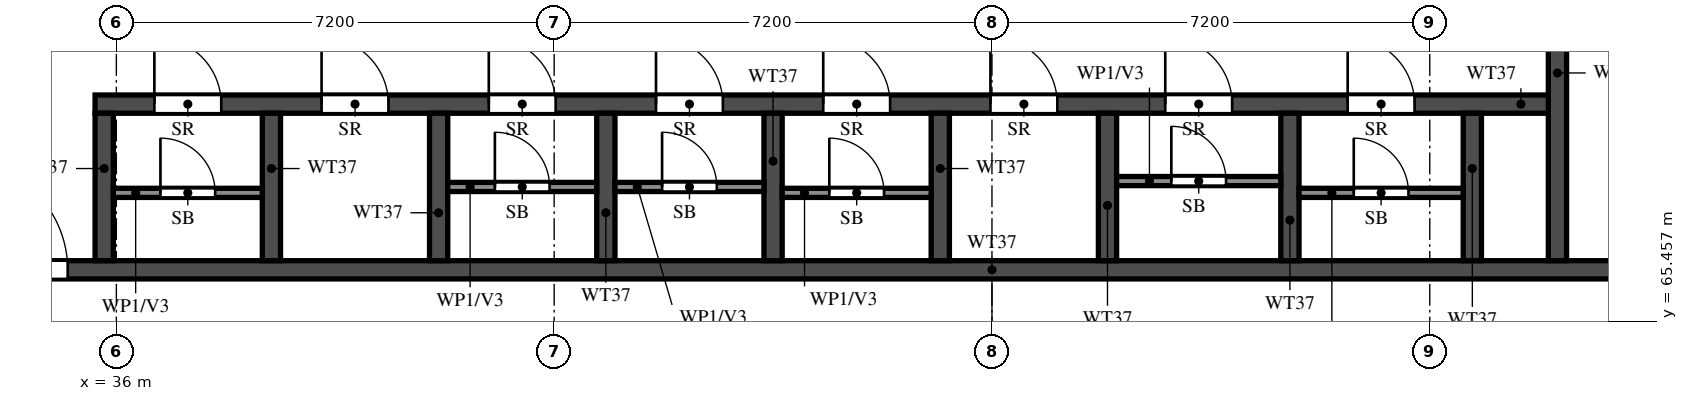
"""IFC4 building model, lengths in metres.
Left out: names, types, materials, properties, quantities, classifications, styles, units other than length and angle.
Written with IfcOpenShell. Run it as: python <this file> out.ifc"""

import sys

from ifc_helpers import new_model, si_unit, direction, frame, frame_2d, origin, place, context, subcontext, project, spatial, rectangle, extrude, element, fill, save


model = new_model("IFC4")
c1 = context("Model", 3, precision=1e-05, world=origin(), true_north=direction((0.0, 1.0)))
c2 = subcontext(c1, "Body", "Model", "MODEL_VIEW")
j1 = project(units=[si_unit("LENGTHUNIT", "METRE"), si_unit("PLANEANGLEUNIT", "RADIAN")], contexts=[c1])
p1 = place(None, origin())
s1 = spatial("IfcSite", under=j1, at=p1, CompositionType="ELEMENT")
p2 = place(p1, origin())
s2 = spatial("IfcBuilding", under=s1, at=p2, CompositionType="ELEMENT")
p3 = place(p2, frame((0.0, 0.0, 229.0)))
s3 = spatial("IfcBuildingStorey", under=s2, at=p3, CompositionType="ELEMENT", Elevation=229.0)
p4 = place(p3, frame((29.2, 66.3, 0.0), z_axis=(0.0, 0.0, 1.0), x_axis=(1.0, 0.0, 0.0)))
e1 = element("IfcWall", 1, at=p4, inside=s3, PredefinedType="SHEAR", context=c2, shape_type="SweptSolid", body=[
    extrude(rectangle(XDim=42.4, YDim=0.3, at=frame_2d((21.2, 0.0))), origin(), (0.0, 0.0, 1.0), 3.22),
])
p5 = place(p4, frame((1.425, 0.0, 0.0)))
e2 = element("IfcOpeningElement", 2, at=p5, cuts=e1, PredefinedType="OPENING", context=c2, shape_type="SweptSolid", body=[
    extrude(rectangle(XDim=1.1, YDim=2.1, at=frame_2d((0.55, 1.05))), frame((0.0, 0.16, 0.0), z_axis=(0.0, -1.0, 0.0), x_axis=(1.0, 0.0, 0.0)), (0.0, 0.0, 1.0), 0.32),
])
p6 = place(p4, frame((4.2, 0.0, 0.0)))
e3 = element("IfcOpeningElement", 3, at=p6, cuts=e1, PredefinedType="OPENING", context=c2, shape_type="SweptSolid", body=[
    extrude(rectangle(XDim=1.8, YDim=2.1, at=frame_2d((0.9, 1.05))), frame((0.0, 0.16, 0.0), z_axis=(0.0, -1.0, 0.0), x_axis=(1.0, 0.0, 0.0)), (0.0, 0.0, 1.0), 0.32),
])
p7 = place(p3, frame((35.65, 69.025, 0.0), z_axis=(0.0, 0.0, 1.0), x_axis=(1.0, 0.0, 0.0)))
e4 = element("IfcWall", 4, at=p7, inside=s3, PredefinedType="SHEAR", context=c2, shape_type="SweptSolid", body=[
    extrude(rectangle(XDim=24.05, YDim=0.3, at=frame_2d((12.025, 0.0))), origin(), (0.0, 0.0, 1.0), 3.22),
])
p8 = place(p7, frame((0.975, 0.0, 0.0)))
e5 = element("IfcOpeningElement", 5, at=p8, cuts=e4, PredefinedType="OPENING", context=c2, shape_type="SweptSolid", body=[
    extrude(rectangle(XDim=1.1, YDim=2.1, at=frame_2d((0.55, 1.05))), frame((0.0, 0.16, 0.0), z_axis=(0.0, -1.0, 0.0), x_axis=(1.0, 0.0, 0.0)), (0.0, 0.0, 1.0), 0.32),
])
p9 = place(p7, frame((3.725, 0.0, 0.0)))
e6 = element("IfcOpeningElement", 6, at=p9, cuts=e4, PredefinedType="OPENING", context=c2, shape_type="SweptSolid", body=[
    extrude(rectangle(XDim=1.1, YDim=2.1, at=frame_2d((0.55, 1.05))), frame((0.0, 0.16, 0.0), z_axis=(0.0, -1.0, 0.0), x_axis=(1.0, 0.0, 0.0)), (0.0, 0.0, 1.0), 0.32),
])
p10 = place(p7, frame((6.475, 0.0, 0.0)))
e7 = element("IfcOpeningElement", 7, at=p10, cuts=e4, PredefinedType="OPENING", context=c2, shape_type="SweptSolid", body=[
    extrude(rectangle(XDim=1.1, YDim=2.1, at=frame_2d((0.55, 1.05))), frame((0.0, 0.16, 0.0), z_axis=(0.0, -1.0, 0.0), x_axis=(1.0, 0.0, 0.0)), (0.0, 0.0, 1.0), 0.32),
])
p11 = place(p7, frame((9.225, 0.0, 0.0)))
e8 = element("IfcOpeningElement", 8, at=p11, cuts=e4, PredefinedType="OPENING", context=c2, shape_type="SweptSolid", body=[
    extrude(rectangle(XDim=1.1, YDim=2.1, at=frame_2d((0.55, 1.05))), frame((0.0, 0.16, 0.0), z_axis=(0.0, -1.0, 0.0), x_axis=(1.0, 0.0, 0.0)), (0.0, 0.0, 1.0), 0.32),
])
p12 = place(p7, frame((11.975, 0.0, 0.0)))
e9 = element("IfcOpeningElement", 9, at=p12, cuts=e4, PredefinedType="OPENING", context=c2, shape_type="SweptSolid", body=[
    extrude(rectangle(XDim=1.1, YDim=2.1, at=frame_2d((0.55, 1.05))), frame((0.0, 0.16, 0.0), z_axis=(0.0, -1.0, 0.0), x_axis=(1.0, 0.0, 0.0)), (0.0, 0.0, 1.0), 0.32),
])
p13 = place(p7, frame((14.725, 0.0, 0.0)))
e10 = element("IfcOpeningElement", 10, at=p13, cuts=e4, PredefinedType="OPENING", context=c2, shape_type="SweptSolid", body=[
    extrude(rectangle(XDim=1.1, YDim=2.1, at=frame_2d((0.55, 1.05))), frame((0.0, 0.16, 0.0), z_axis=(0.0, -1.0, 0.0), x_axis=(1.0, 0.0, 0.0)), (0.0, 0.0, 1.0), 0.32),
])
p14 = place(p7, frame((17.6, 0.0, 0.0)))
e11 = element("IfcOpeningElement", 11, at=p14, cuts=e4, PredefinedType="OPENING", context=c2, shape_type="SweptSolid", body=[
    extrude(rectangle(XDim=1.1, YDim=2.1, at=frame_2d((0.55, 1.05))), frame((0.0, 0.16, 0.0), z_axis=(0.0, -1.0, 0.0), x_axis=(1.0, 0.0, 0.0)), (0.0, 0.0, 1.0), 0.32),
])
p15 = place(p7, frame((20.6, 0.0, 0.0)))
e12 = element("IfcOpeningElement", 12, at=p15, cuts=e4, PredefinedType="OPENING", context=c2, shape_type="SweptSolid", body=[
    extrude(rectangle(XDim=1.1, YDim=2.1, at=frame_2d((0.55, 1.05))), frame((0.0, 0.16, 0.0), z_axis=(0.0, -1.0, 0.0), x_axis=(1.0, 0.0, 0.0)), (0.0, 0.0, 1.0), 0.32),
])
p16 = place(p3, frame((59.7, 66.45, 0.0), z_axis=(0.0, 0.0, 1.0), x_axis=(0.0, 1.0, 0.0)))
e13 = element("IfcWall", 13, at=p16, inside=s3, PredefinedType="SHEAR", context=c2, shape_type="SweptSolid", body=[
    extrude(rectangle(XDim=6.175, YDim=0.3, at=frame_2d((3.087, 0.0))), origin(), (0.0, 0.0, 1.0), 3.22),
])
p17 = place(p16, frame((3.85, 0.0, 0.0)))
e14 = element("IfcOpeningElement", 14, at=p17, cuts=e13, PredefinedType="OPENING", context=c2, shape_type="SweptSolid", body=[
    extrude(rectangle(XDim=1.2, YDim=2.1, at=frame_2d((0.6, 1.05))), frame((0.0, 0.16, 0.0), z_axis=(0.0, -1.0, 0.0), x_axis=(1.0, 0.0, 0.0)), (0.0, 0.0, 1.0), 0.32),
])
for number, where, z_axis, x_axis in (
    (15, (35.8, 66.45, 0.0), (0.0, 0.0, 1.0), (0.0, 1.0, 0.0)),
    (16, (38.55, 66.45, 0.0), (0.0, 0.0, 1.0), (0.0, 1.0, 0.0)),
    (17, (41.3, 66.45, 0.0), (0.0, 0.0, 1.0), (0.0, 1.0, 0.0)),
    (18, (44.05, 66.45, 0.0), (0.0, 0.0, 1.0), (0.0, 1.0, 0.0)),
    (19, (46.8, 66.45, 0.0), (0.0, 0.0, 1.0), (0.0, 1.0, 0.0)),
    (20, (49.55, 66.45, 0.0), (0.0, 0.0, 1.0), (0.0, 1.0, 0.0)),
    (21, (52.3, 66.45, 0.0), (0.0, 0.0, 1.0), (0.0, 1.0, 0.0)),
    (22, (55.3, 66.45, 0.0), (0.0, 0.0, 1.0), (0.0, 1.0, 0.0)),
    (23, (58.3, 66.45, 0.0), (0.0, 0.0, 1.0), (0.0, 1.0, 0.0)),
):
    element("IfcWall", number, at=place(p3, frame(where, z_axis=z_axis, x_axis=x_axis)), inside=s3, PredefinedType="SHEAR", context=c2, shape_type="SweptSolid", body=[
        extrude(rectangle(XDim=2.425, YDim=0.3, at=frame_2d((1.212, 0.0))), origin(), (0.0, 0.0, 1.0), 3.22),
    ])
p18 = place(p3, frame((35.95, 67.565, 0.0), z_axis=(0.0, 0.0, 1.0), x_axis=(1.0, 0.0, 0.0)))
e24 = element("IfcWall", 24, at=p18, inside=s3, PredefinedType="PARTITIONING", context=c2, shape_type="SweptSolid", body=[
    extrude(rectangle(XDim=2.45, YDim=0.15, at=frame_2d((1.225, 0.0))), origin(), (0.0, 0.0, 1.0), 3.22),
])
p19 = place(p18, frame((0.775, 0.0, 0.0)))
e25 = element("IfcOpeningElement", 25, at=p19, cuts=e24, PredefinedType="OPENING", context=c2, shape_type="SweptSolid", body=[
    extrude(rectangle(XDim=0.9, YDim=2.1, at=frame_2d((0.45, 1.05))), frame((0.0, 0.085, 0.0), z_axis=(0.0, -1.0, 0.0), x_axis=(1.0, 0.0, 0.0)), (0.0, 0.0, 1.0), 0.17),
])
p20 = place(p3, frame((41.45, 67.663, 0.0), z_axis=(0.0, 0.0, 1.0), x_axis=(1.0, 0.0, 0.0)))
e26 = element("IfcWall", 26, at=p20, inside=s3, PredefinedType="PARTITIONING", context=c2, shape_type="SweptSolid", body=[
    extrude(rectangle(XDim=2.45, YDim=0.15, at=frame_2d((1.225, 0.0))), origin(), (0.0, 0.0, 1.0), 3.22),
])
p21 = place(p20, frame((0.775, 0.0, 0.0)))
e27 = element("IfcOpeningElement", 27, at=p21, cuts=e26, PredefinedType="OPENING", context=c2, shape_type="SweptSolid", body=[
    extrude(rectangle(XDim=0.9, YDim=2.1, at=frame_2d((0.45, 1.05))), frame((0.0, 0.085, 0.0), z_axis=(0.0, -1.0, 0.0), x_axis=(1.0, 0.0, 0.0)), (0.0, 0.0, 1.0), 0.17),
])
p22 = place(p3, frame((44.2, 67.663, 0.0), z_axis=(0.0, 0.0, 1.0), x_axis=(1.0, 0.0, 0.0)))
e28 = element("IfcWall", 28, at=p22, inside=s3, PredefinedType="PARTITIONING", context=c2, shape_type="SweptSolid", body=[
    extrude(rectangle(XDim=2.45, YDim=0.15, at=frame_2d((1.225, 0.0))), origin(), (0.0, 0.0, 1.0), 3.22),
])
p23 = place(p22, frame((0.775, 0.0, 0.0)))
e29 = element("IfcOpeningElement", 29, at=p23, cuts=e28, PredefinedType="OPENING", context=c2, shape_type="SweptSolid", body=[
    extrude(rectangle(XDim=0.9, YDim=2.1, at=frame_2d((0.45, 1.05))), frame((0.0, 0.085, 0.0), z_axis=(0.0, -1.0, 0.0), x_axis=(1.0, 0.0, 0.0)), (0.0, 0.0, 1.0), 0.17),
])
p24 = place(p3, frame((46.95, 67.565, 0.0), z_axis=(0.0, 0.0, 1.0), x_axis=(1.0, 0.0, 0.0)))
e30 = element("IfcWall", 30, at=p24, inside=s3, PredefinedType="PARTITIONING", context=c2, shape_type="SweptSolid", body=[
    extrude(rectangle(XDim=2.45, YDim=0.15, at=frame_2d((1.225, 0.0))), origin(), (0.0, 0.0, 1.0), 3.22),
])
p25 = place(p24, frame((0.775, 0.0, 0.0)))
e31 = element("IfcOpeningElement", 31, at=p25, cuts=e30, PredefinedType="OPENING", context=c2, shape_type="SweptSolid", body=[
    extrude(rectangle(XDim=0.9, YDim=2.1, at=frame_2d((0.45, 1.05))), frame((0.0, 0.085, 0.0), z_axis=(0.0, -1.0, 0.0), x_axis=(1.0, 0.0, 0.0)), (0.0, 0.0, 1.0), 0.17),
])
p26 = place(p3, frame((52.45, 67.76, 0.0), z_axis=(0.0, 0.0, 1.0), x_axis=(1.0, 0.0, 0.0)))
e32 = element("IfcWall", 32, at=p26, inside=s3, PredefinedType="PARTITIONING", context=c2, shape_type="SweptSolid", body=[
    extrude(rectangle(XDim=2.7, YDim=0.15, at=frame_2d((1.35, 0.0))), origin(), (0.0, 0.0, 1.0), 3.22),
])
p27 = place(p26, frame((0.9, 0.0, 0.0)))
e33 = element("IfcOpeningElement", 33, at=p27, cuts=e32, PredefinedType="OPENING", context=c2, shape_type="SweptSolid", body=[
    extrude(rectangle(XDim=0.9, YDim=2.1, at=frame_2d((0.45, 1.05))), frame((0.0, 0.085, 0.0), z_axis=(0.0, -1.0, 0.0), x_axis=(1.0, 0.0, 0.0)), (0.0, 0.0, 1.0), 0.17),
])
p28 = place(p3, frame((55.45, 67.565, 0.0), z_axis=(0.0, 0.0, 1.0), x_axis=(1.0, 0.0, 0.0)))
e34 = element("IfcWall", 34, at=p28, inside=s3, PredefinedType="PARTITIONING", context=c2, shape_type="SweptSolid", body=[
    extrude(rectangle(XDim=2.7, YDim=0.15, at=frame_2d((1.35, 0.0))), origin(), (0.0, 0.0, 1.0), 3.22),
])
p29 = place(p28, frame((0.9, 0.0, 0.0)))
e35 = element("IfcOpeningElement", 35, at=p29, cuts=e34, PredefinedType="OPENING", context=c2, shape_type="SweptSolid", body=[
    extrude(rectangle(XDim=0.9, YDim=2.1, at=frame_2d((0.45, 1.05))), frame((0.0, 0.085, 0.0), z_axis=(0.0, -1.0, 0.0), x_axis=(1.0, 0.0, 0.0)), (0.0, 0.0, 1.0), 0.17),
])
p30 = place(p6, origin())
e36 = element("IfcDoor", 36, at=p30, inside=s3, OperationType="DOUBLE_DOOR_SINGLE_SWING", PredefinedType="DOOR", context=c2, shape_type="SweptSolid", body=[
    extrude(rectangle(XDim=1.8, YDim=2.1, at=frame_2d((0.9, 1.05))), frame((0.0, 0.025, 0.0), z_axis=(0.0, -1.0, 0.0), x_axis=(1.0, 0.0, 0.0)), (0.0, 0.0, 1.0), 0.05),
])
fill(e3, e36)
p31 = place(p8, origin())
e37 = element("IfcDoor", 37, at=p31, inside=s3, OperationType="SINGLE_SWING_RIGHT", PredefinedType="DOOR", context=c2, shape_type="SweptSolid", body=[
    extrude(rectangle(XDim=1.1, YDim=2.1, at=frame_2d((0.55, 1.05))), frame((0.0, 0.025, 0.0), z_axis=(0.0, -1.0, 0.0), x_axis=(1.0, 0.0, 0.0)), (0.0, 0.0, 1.0), 0.05),
])
fill(e5, e37)
p32 = place(p19, origin())
e38 = element("IfcDoor", 38, at=p32, inside=s3, OperationType="SINGLE_SWING_RIGHT", PredefinedType="DOOR", context=c2, shape_type="SweptSolid", body=[
    extrude(rectangle(XDim=0.9, YDim=2.1, at=frame_2d((0.45, 1.05))), frame((0.0, 0.025, 0.0), z_axis=(0.0, -1.0, 0.0), x_axis=(1.0, 0.0, 0.0)), (0.0, 0.0, 1.0), 0.05),
])
fill(e25, e38)
p33 = place(p9, origin())
e39 = element("IfcDoor", 39, at=p33, inside=s3, OperationType="SINGLE_SWING_LEFT", PredefinedType="DOOR", context=c2, shape_type="SweptSolid", body=[
    extrude(rectangle(XDim=1.1, YDim=2.1, at=frame_2d((0.55, 1.05))), frame((0.0, 0.025, 0.0), z_axis=(0.0, -1.0, 0.0), x_axis=(1.0, 0.0, 0.0)), (0.0, 0.0, 1.0), 0.05),
])
fill(e6, e39)
p34 = place(p10, origin())
e40 = element("IfcDoor", 40, at=p34, inside=s3, OperationType="SINGLE_SWING_RIGHT", PredefinedType="DOOR", context=c2, shape_type="SweptSolid", body=[
    extrude(rectangle(XDim=1.1, YDim=2.1, at=frame_2d((0.55, 1.05))), frame((0.0, 0.025, 0.0), z_axis=(0.0, -1.0, 0.0), x_axis=(1.0, 0.0, 0.0)), (0.0, 0.0, 1.0), 0.05),
])
fill(e7, e40)
p35 = place(p21, origin())
e41 = element("IfcDoor", 41, at=p35, inside=s3, OperationType="SINGLE_SWING_RIGHT", PredefinedType="DOOR", context=c2, shape_type="SweptSolid", body=[
    extrude(rectangle(XDim=0.9, YDim=2.1, at=frame_2d((0.45, 1.05))), frame((0.0, 0.025, 0.0), z_axis=(0.0, -1.0, 0.0), x_axis=(1.0, 0.0, 0.0)), (0.0, 0.0, 1.0), 0.05),
])
fill(e27, e41)
p36 = place(p11, origin())
e42 = element("IfcDoor", 42, at=p36, inside=s3, OperationType="SINGLE_SWING_LEFT", PredefinedType="DOOR", context=c2, shape_type="SweptSolid", body=[
    extrude(rectangle(XDim=1.1, YDim=2.1, at=frame_2d((0.55, 1.05))), frame((0.0, 0.025, 0.0), z_axis=(0.0, -1.0, 0.0), x_axis=(1.0, 0.0, 0.0)), (0.0, 0.0, 1.0), 0.05),
])
fill(e8, e42)
p37 = place(p23, origin())
e43 = element("IfcDoor", 43, at=p37, inside=s3, OperationType="SINGLE_SWING_LEFT", PredefinedType="DOOR", context=c2, shape_type="SweptSolid", body=[
    extrude(rectangle(XDim=0.9, YDim=2.1, at=frame_2d((0.45, 1.05))), frame((0.0, 0.025, 0.0), z_axis=(0.0, -1.0, 0.0), x_axis=(1.0, 0.0, 0.0)), (0.0, 0.0, 1.0), 0.05),
])
fill(e29, e43)
p38 = place(p12, origin())
e44 = element("IfcDoor", 44, at=p38, inside=s3, OperationType="SINGLE_SWING_RIGHT", PredefinedType="DOOR", context=c2, shape_type="SweptSolid", body=[
    extrude(rectangle(XDim=1.1, YDim=2.1, at=frame_2d((0.55, 1.05))), frame((0.0, 0.025, 0.0), z_axis=(0.0, -1.0, 0.0), x_axis=(1.0, 0.0, 0.0)), (0.0, 0.0, 1.0), 0.05),
])
fill(e9, e44)
p39 = place(p25, origin())
e45 = element("IfcDoor", 45, at=p39, inside=s3, OperationType="SINGLE_SWING_RIGHT", PredefinedType="DOOR", context=c2, shape_type="SweptSolid", body=[
    extrude(rectangle(XDim=0.9, YDim=2.1, at=frame_2d((0.45, 1.05))), frame((0.0, 0.025, 0.0), z_axis=(0.0, -1.0, 0.0), x_axis=(1.0, 0.0, 0.0)), (0.0, 0.0, 1.0), 0.05),
])
fill(e31, e45)
p40 = place(p13, origin())
e46 = element("IfcDoor", 46, at=p40, inside=s3, OperationType="SINGLE_SWING_LEFT", PredefinedType="DOOR", context=c2, shape_type="SweptSolid", body=[
    extrude(rectangle(XDim=1.1, YDim=2.1, at=frame_2d((0.55, 1.05))), frame((0.0, 0.025, 0.0), z_axis=(0.0, -1.0, 0.0), x_axis=(1.0, 0.0, 0.0)), (0.0, 0.0, 1.0), 0.05),
])
fill(e10, e46)
p41 = place(p14, origin())
e47 = element("IfcDoor", 47, at=p41, inside=s3, OperationType="SINGLE_SWING_RIGHT", PredefinedType="DOOR", context=c2, shape_type="SweptSolid", body=[
    extrude(rectangle(XDim=1.1, YDim=2.1, at=frame_2d((0.55, 1.05))), frame((0.0, 0.025, 0.0), z_axis=(0.0, -1.0, 0.0), x_axis=(1.0, 0.0, 0.0)), (0.0, 0.0, 1.0), 0.05),
])
fill(e11, e47)
p42 = place(p27, origin())
e48 = element("IfcDoor", 48, at=p42, inside=s3, OperationType="SINGLE_SWING_LEFT", PredefinedType="DOOR", context=c2, shape_type="SweptSolid", body=[
    extrude(rectangle(XDim=0.9, YDim=2.1, at=frame_2d((0.45, 1.05))), frame((0.0, 0.025, 0.0), z_axis=(0.0, -1.0, 0.0), x_axis=(1.0, 0.0, 0.0)), (0.0, 0.0, 1.0), 0.05),
])
fill(e33, e48)
p43 = place(p15, origin())
e49 = element("IfcDoor", 49, at=p43, inside=s3, OperationType="SINGLE_SWING_RIGHT", PredefinedType="DOOR", context=c2, shape_type="SweptSolid", body=[
    extrude(rectangle(XDim=1.1, YDim=2.1, at=frame_2d((0.55, 1.05))), frame((0.0, 0.025, 0.0), z_axis=(0.0, -1.0, 0.0), x_axis=(1.0, 0.0, 0.0)), (0.0, 0.0, 1.0), 0.05),
])
fill(e12, e49)
p44 = place(p29, origin())
e50 = element("IfcDoor", 50, at=p44, inside=s3, OperationType="SINGLE_SWING_RIGHT", PredefinedType="DOOR", context=c2, shape_type="SweptSolid", body=[
    extrude(rectangle(XDim=0.9, YDim=2.1, at=frame_2d((0.45, 1.05))), frame((0.0, 0.025, 0.0), z_axis=(0.0, -1.0, 0.0), x_axis=(1.0, 0.0, 0.0)), (0.0, 0.0, 1.0), 0.05),
])
fill(e35, e50)
save(model, sys.argv[1])
